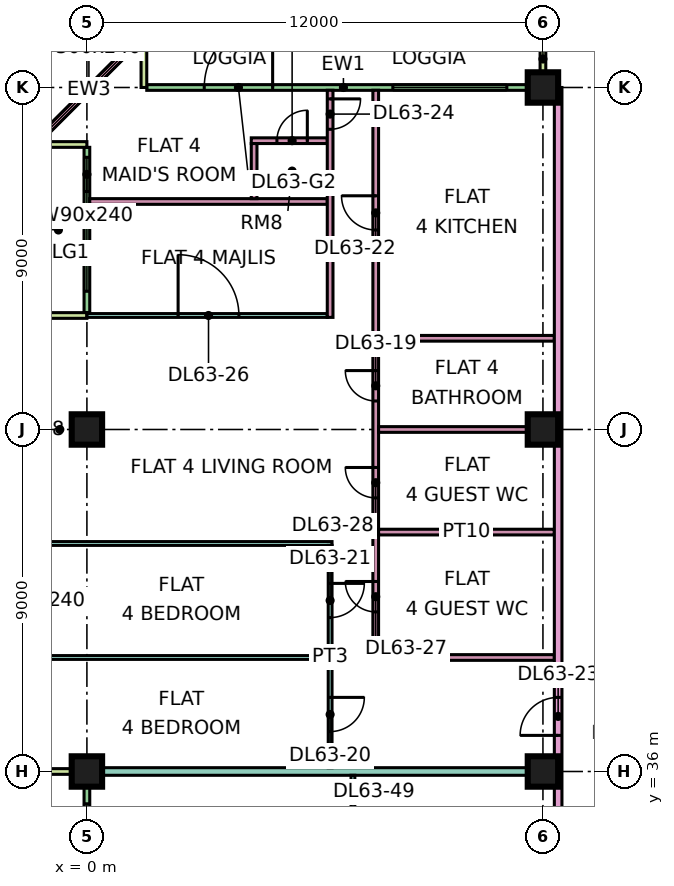
"""IFC4 building model, lengths in metres.
Left out: names, types, materials, properties, quantities, classifications, styles, units other than length and angle.
Written with IfcOpenShell. Run it as: python <this file> out.ifc"""

import sys

from ifc_helpers import new_model, si_unit, direction, frame, frame_2d, origin, origin_2d, place, context, subcontext, project, spatial, rectangle, extrude, element, fill, save


model = new_model("IFC4")
c1 = context("Model", 3, precision=1e-05, world=origin(), true_north=direction((0.0, 1.0)))
c2 = subcontext(c1, "Body", "Model", "MODEL_VIEW")
j1 = project(units=[si_unit("LENGTHUNIT", "METRE"), si_unit("PLANEANGLEUNIT", "RADIAN")], contexts=[c1])
p1 = place(None, origin())
s1 = spatial("IfcSite", under=j1, at=p1, CompositionType="ELEMENT")
p2 = place(p1, origin())
s2 = spatial("IfcBuilding", under=s1, at=p2, CompositionType="ELEMENT")
p3 = place(p2, frame((0.0, 0.0, 273.4)))
s3 = spatial("IfcBuildingStorey", under=s2, at=p3, CompositionType="ELEMENT", Elevation=273.4)
p4 = place(p3, frame((0.0, 36.0, 0.0), z_axis=(0.0, 0.0, 1.0), x_axis=(1.0, 0.0, 0.0)))
e1 = element("IfcColumn", 1, at=p4, inside=s3, PredefinedType="COLUMN", context=c2, shape_type="SweptSolid", body=[
    extrude(rectangle(XDim=0.8, YDim=0.8, at=origin_2d()), origin(), (0.0, 0.0, 1.0), 3.75),
])
for number, where, z_axis, x_axis in (
    (2, (0.0, 45.0, 0.0), (0.0, 0.0, 1.0), (1.0, 0.0, 0.0)),
    (3, (12.0, 36.0, 0.0), (0.0, 0.0, 1.0), (1.0, 0.0, 0.0)),
    (4, (12.0, 45.0, 0.0), (0.0, 0.0, 1.0), (1.0, 0.0, 0.0)),
    (5, (12.0, 54.0, 0.0), (0.0, 0.0, 1.0), (1.0, 0.0, 0.0)),
):
    element("IfcColumn", number, at=place(p3, frame(where, z_axis=z_axis, x_axis=x_axis)), inside=s3, PredefinedType="COLUMN", context=c2, shape_type="SweptSolid", body=[
        extrude(rectangle(XDim=0.8, YDim=0.8, at=origin_2d()), origin(), (0.0, 0.0, 1.0), 3.75),
    ])
p5 = place(p3, frame((11.925, 54.0, 0.0), z_axis=(0.0, 0.0, 1.0), x_axis=(-1.0, 0.0, 0.0)))
e6 = element("IfcWall", 6, at=p5, inside=s3, PredefinedType="SOLIDWALL", context=c2, shape_type="SweptSolid", body=[
    extrude(rectangle(XDim=10.35, YDim=0.15, at=frame_2d((5.175, 0.0))), origin(), (0.0, 0.0, 1.0), 3.35),
])
p6 = place(p5, frame((0.875, 0.0, 0.45)))
e7 = element("IfcOpeningElement", 7, at=p6, cuts=e6, PredefinedType="OPENING", context=c2, shape_type="SweptSolid", body=[
    extrude(rectangle(XDim=3.0, YDim=2.4, at=frame_2d((1.5, 1.2))), frame((0.0, 0.085, 0.0), z_axis=(0.0, -1.0, 0.0), x_axis=(1.0, 0.0, 0.0)), (0.0, 0.0, 1.0), 0.17),
])
p7 = place(p5, frame((7.038, 0.0, 0.0)))
e8 = element("IfcOpeningElement", 8, at=p7, cuts=e6, PredefinedType="OPENING", context=c2, shape_type="SweptSolid", body=[
    extrude(rectangle(XDim=1.8, YDim=2.4, at=frame_2d((0.9, 1.2))), frame((0.0, 0.085, 0.0), z_axis=(0.0, -1.0, 0.0), x_axis=(1.0, 0.0, 0.0)), (0.0, 0.0, 1.0), 0.17),
])
for number, where, z_axis, x_axis in (
    (9, (12.0, 55.5, 0.0), (0.0, 0.0, 1.0), (0.0, -1.0, 0.0)),
    (10, (1.5, 55.5, 0.0), (0.0, 0.0, 1.0), (0.0, -1.0, 0.0)),
):
    element("IfcWall", number, at=place(p3, frame(where, z_axis=z_axis, x_axis=x_axis)), inside=s3, PredefinedType="SOLIDWALL", context=c2, shape_type="SweptSolid", body=[
        extrude(rectangle(XDim=1.5, YDim=0.15, at=frame_2d((0.75, 0.0))), origin(), (0.0, 0.0, 1.0), 3.35),
    ])
p8 = place(p3, frame((1.553, 55.447, 0.0), z_axis=(0.0, 0.0, 1.0), x_axis=(-0.707106781187, -0.707106781187, 0.0)))
e11 = element("IfcWall", 11, at=p8, inside=s3, PredefinedType="SOLIDWALL", context=c2, shape_type="SweptSolid", body=[
    extrude(rectangle(XDim=4.243, YDim=0.15, at=frame_2d((2.121, 0.0))), origin(), (0.0, 0.0, 1.0), 3.35),
])
p9 = place(p8, frame((0.621, 0.0, 0.45)))
e12 = element("IfcOpeningElement", 12, at=p9, cuts=e11, PredefinedType="OPENING", context=c2, shape_type="SweptSolid", body=[
    extrude(rectangle(XDim=3.0, YDim=2.4, at=frame_2d((1.5, 1.2))), frame((0.0, 0.085, 0.0), z_axis=(0.0, -1.0, 0.0), x_axis=(1.0, 0.0, 0.0)), (0.0, 0.0, 1.0), 0.17),
])
p10 = place(p3, frame((0.0, 52.425, 0.0), z_axis=(0.0, 0.0, 1.0), x_axis=(0.0, -1.0, 0.0)))
e13 = element("IfcWall", 13, at=p10, inside=s3, PredefinedType="SOLIDWALL", context=c2, shape_type="SweptSolid", body=[
    extrude(rectangle(XDim=4.35, YDim=0.15, at=frame_2d((2.175, 0.0))), origin(), (0.0, 0.0, 1.0), 3.35),
])
p11 = place(p10, frame((0.262, 0.0, 0.45)))
e14 = element("IfcOpeningElement", 14, at=p11, cuts=e13, PredefinedType="OPENING", context=c2, shape_type="SweptSolid", body=[
    extrude(rectangle(XDim=0.9, YDim=2.4, at=frame_2d((0.45, 1.2))), frame((0.0, 0.085, 0.0), z_axis=(0.0, -1.0, 0.0), x_axis=(1.0, 0.0, 0.0)), (0.0, 0.0, 1.0), 0.17),
])
p12 = place(p10, frame((1.988, 0.0, 0.45)))
e15 = element("IfcOpeningElement", 15, at=p12, cuts=e13, PredefinedType="OPENING", context=c2, shape_type="SweptSolid", body=[
    extrude(rectangle(XDim=1.8, YDim=2.4, at=frame_2d((0.9, 1.2))), frame((0.0, 0.085, 0.0), z_axis=(0.0, -1.0, 0.0), x_axis=(1.0, 0.0, 0.0)), (0.0, 0.0, 1.0), 0.17),
])
for number, where, z_axis, x_axis in (
    (16, (-1.5, 52.5, 0.0), (0.0, 0.0, 1.0), (1.0, 0.0, 0.0)),
    (17, (-1.5, 48.0, 0.0), (0.0, 0.0, 1.0), (1.0, 0.0, 0.0)),
):
    element("IfcWall", number, at=place(p3, frame(where, z_axis=z_axis, x_axis=x_axis)), inside=s3, PredefinedType="SOLIDWALL", context=c2, shape_type="SweptSolid", body=[
        extrude(rectangle(XDim=1.5, YDim=0.15, at=frame_2d((0.75, 0.0))), origin(), (0.0, 0.0, 1.0), 3.35),
    ])
p13 = place(p3, frame((0.0, 35.925, 0.0), z_axis=(0.0, 0.0, 1.0), x_axis=(0.0, -1.0, 0.0)))
e18 = element("IfcWall", 18, at=p13, inside=s3, PredefinedType="SOLIDWALL", context=c2, shape_type="SweptSolid", body=[
    extrude(rectangle(XDim=11.85, YDim=0.15, at=frame_2d((5.925, 0.0))), origin(), (0.0, 0.0, 1.0), 3.35),
])
p14 = place(p13, frame((0.775, 0.0, 0.45)))
e19 = element("IfcOpeningElement", 19, at=p14, cuts=e18, PredefinedType="OPENING", context=c2, shape_type="SweptSolid", body=[
    extrude(rectangle(XDim=1.8, YDim=2.4, at=frame_2d((0.9, 1.2))), frame((0.0, 0.085, 0.0), z_axis=(0.0, -1.0, 0.0), x_axis=(1.0, 0.0, 0.0)), (0.0, 0.0, 1.0), 0.17),
])
p15 = place(p13, frame((3.525, 0.0, 0.0)))
e20 = element("IfcOpeningElement", 20, at=p15, cuts=e18, PredefinedType="OPENING", context=c2, shape_type="SweptSolid", body=[
    extrude(rectangle(XDim=1.8, YDim=2.4, at=frame_2d((0.9, 1.2))), frame((0.0, 0.085, 0.0), z_axis=(0.0, -1.0, 0.0), x_axis=(1.0, 0.0, 0.0)), (0.0, 0.0, 1.0), 0.17),
])
p16 = place(p13, frame((7.175, 0.0, 0.45)))
e21 = element("IfcOpeningElement", 21, at=p16, cuts=e18, PredefinedType="OPENING", context=c2, shape_type="SweptSolid", body=[
    extrude(rectangle(XDim=3.0, YDim=2.4, at=frame_2d((1.5, 1.2))), frame((0.0, 0.085, 0.0), z_axis=(0.0, -1.0, 0.0), x_axis=(1.0, 0.0, 0.0)), (0.0, 0.0, 1.0), 0.17),
])
p17 = place(p3, frame((-1.5, 36.0, 0.0), z_axis=(0.0, 0.0, 1.0), x_axis=(1.0, 0.0, 0.0)))
e22 = element("IfcWall", 22, at=p17, inside=s3, PredefinedType="SOLIDWALL", context=c2, shape_type="SweptSolid", body=[
    extrude(rectangle(XDim=1.5, YDim=0.15, at=frame_2d((0.75, 0.0))), origin(), (0.0, 0.0, 1.0), 3.35),
])
p18 = place(p3, frame((-1.351, 39.0, 0.0), z_axis=(0.0, 0.0, 1.0), x_axis=(1.0, 0.0, 0.0)))
e23 = element("IfcWall", 23, at=p18, inside=s3, PredefinedType="PARTITIONING", context=c2, shape_type="SweptSolid", body=[
    extrude(rectangle(XDim=7.701, YDim=0.1, at=frame_2d((3.851, 0.0))), origin(), (0.0, 0.0, 1.0), 3.35),
])
e24 = element("IfcWall", 24, at=p4, inside=s3, PredefinedType="PARTITIONING", context=c2, shape_type="SweptSolid", body=[
    extrude(rectangle(XDim=12.3, YDim=0.2, at=frame_2d((6.15, 0.0))), origin(), (0.0, 0.0, 1.0), 3.35),
])
p19 = place(p3, frame((-1.35, 42.0, 0.0), z_axis=(0.0, 0.0, 1.0), x_axis=(1.0, 0.0, 0.0)))
e25 = element("IfcWall", 25, at=p19, inside=s3, PredefinedType="PARTITIONING", context=c2, shape_type="SweptSolid", body=[
    extrude(rectangle(XDim=7.8, YDim=0.1, at=frame_2d((3.9, 0.0))), origin(), (0.0, 0.0, 1.0), 3.35),
])
p20 = place(p3, frame((0.0, 48.0, 0.0), z_axis=(0.0, 0.0, 1.0), x_axis=(1.0, 0.0, 0.0)))
e26 = element("IfcWall", 26, at=p20, inside=s3, PredefinedType="PARTITIONING", context=c2, shape_type="SweptSolid", body=[
    extrude(rectangle(XDim=6.325, YDim=0.1, at=frame_2d((3.163, 0.0))), origin(), (0.0, 0.0, 1.0), 3.35),
])
p21 = place(p20, frame((2.4, 0.0, 0.0)))
e27 = element("IfcOpeningElement", 27, at=p21, cuts=e26, PredefinedType="OPENING", context=c2, shape_type="SweptSolid", body=[
    extrude(rectangle(XDim=1.6, YDim=2.1, at=frame_2d((0.8, 1.05))), frame((0.0, 0.06, 0.0), z_axis=(0.0, -1.0, 0.0), x_axis=(1.0, 0.0, 0.0)), (0.0, 0.0, 1.0), 0.12),
])
p22 = place(p3, frame((0.074, 51.0, 0.0), z_axis=(0.0, 0.0, 1.0), x_axis=(1.0, 0.0, 0.0)))
e28 = element("IfcWall", 28, at=p22, inside=s3, PredefinedType="PARTITIONING", context=c2, shape_type="SweptSolid", body=[
    extrude(rectangle(XDim=6.251, YDim=0.15, at=frame_2d((3.125, 0.0))), origin(), (0.0, 0.0, 1.0), 3.35),
])
p23 = place(p3, frame((4.325, 52.6, 0.0), z_axis=(0.0, 0.0, 1.0), x_axis=(1.0, 0.0, 0.0)))
e29 = element("IfcWall", 29, at=p23, inside=s3, PredefinedType="PARTITIONING", context=c2, shape_type="SweptSolid", body=[
    extrude(rectangle(XDim=2.0, YDim=0.15, at=frame_2d((1.0, 0.0))), origin(), (0.0, 0.0, 1.0), 3.35),
])
p24 = place(p23, frame((0.675, 0.0, 0.0)))
e30 = element("IfcOpeningElement", 30, at=p24, cuts=e29, PredefinedType="OPENING", context=c2, shape_type="SweptSolid", body=[
    extrude(rectangle(XDim=0.8, YDim=2.1, at=frame_2d((0.4, 1.05))), frame((0.0, 0.085, 0.0), z_axis=(0.0, -1.0, 0.0), x_axis=(1.0, 0.0, 0.0)), (0.0, 0.0, 1.0), 0.17),
])
p25 = place(p3, frame((4.4, 51.075, 0.0), z_axis=(0.0, 0.0, 1.0), x_axis=(0.0, 1.0, 0.0)))
e31 = element("IfcWall", 31, at=p25, inside=s3, PredefinedType="PARTITIONING", context=c2, shape_type="SweptSolid", body=[
    extrude(rectangle(XDim=1.45, YDim=0.15, at=frame_2d((0.725, 0.0))), origin(), (0.0, 0.0, 1.0), 3.35),
])
p26 = place(p3, frame((6.4, 36.1, 0.0), z_axis=(0.0, 0.0, 1.0), x_axis=(0.0, 1.0, 0.0)))
e32 = element("IfcWall", 32, at=p26, inside=s3, PredefinedType="PARTITIONING", context=c2, shape_type="SweptSolid", body=[
    extrude(rectangle(XDim=5.85, YDim=0.1, at=frame_2d((2.925, 0.0))), origin(), (0.0, 0.0, 1.0), 3.35),
])
p27 = place(p26, frame((0.95, 0.0, 0.0)))
e33 = element("IfcOpeningElement", 33, at=p27, cuts=e32, PredefinedType="OPENING", context=c2, shape_type="SweptSolid", body=[
    extrude(rectangle(XDim=0.9, YDim=2.1, at=frame_2d((0.45, 1.05))), frame((0.0, 0.06, 0.0), z_axis=(0.0, -1.0, 0.0), x_axis=(1.0, 0.0, 0.0)), (0.0, 0.0, 1.0), 0.12),
])
p28 = place(p26, frame((3.95, 0.0, 0.0)))
e34 = element("IfcOpeningElement", 34, at=p28, cuts=e32, PredefinedType="OPENING", context=c2, shape_type="SweptSolid", body=[
    extrude(rectangle(XDim=0.9, YDim=2.1, at=frame_2d((0.45, 1.05))), frame((0.0, 0.06, 0.0), z_axis=(0.0, -1.0, 0.0), x_axis=(1.0, 0.0, 0.0)), (0.0, 0.0, 1.0), 0.12),
])
p29 = place(p3, frame((6.4, 47.95, 0.0), z_axis=(0.0, 0.0, 1.0), x_axis=(0.0, 1.0, 0.0)))
e35 = element("IfcWall", 35, at=p29, inside=s3, PredefinedType="PARTITIONING", context=c2, shape_type="SweptSolid", body=[
    extrude(rectangle(XDim=5.976, YDim=0.15, at=frame_2d((2.988, 0.0))), origin(), (0.0, 0.0, 1.0), 3.35),
])
p30 = place(p29, frame((4.95, 0.0, 0.0)))
e36 = element("IfcOpeningElement", 36, at=p30, cuts=e35, PredefinedType="OPENING", context=c2, shape_type="SweptSolid", body=[
    extrude(rectangle(XDim=0.8, YDim=2.1, at=frame_2d((0.4, 1.05))), frame((0.0, 0.085, 0.0), z_axis=(0.0, -1.0, 0.0), x_axis=(1.0, 0.0, 0.0)), (0.0, 0.0, 1.0), 0.17),
])
p31 = place(p3, frame((7.0, 30.05, 0.0), z_axis=(0.0, 0.0, 1.0), x_axis=(0.0, 1.0, 0.0)))
e37 = element("IfcWall", 37, at=p31, inside=s3, PredefinedType="PARTITIONING", context=c2, shape_type="SweptSolid", body=[
    extrude(rectangle(XDim=5.85, YDim=0.1, at=frame_2d((2.925, 0.0))), origin(), (0.0, 0.0, 1.0), 3.35),
])
p32 = place(p31, frame((1.0, 0.0, 0.0)))
e38 = element("IfcOpeningElement", 38, at=p32, cuts=e37, PredefinedType="OPENING", context=c2, shape_type="SweptSolid", body=[
    extrude(rectangle(XDim=0.9, YDim=2.1, at=frame_2d((0.45, 1.05))), frame((0.0, 0.06, 0.0), z_axis=(0.0, -1.0, 0.0), x_axis=(1.0, 0.0, 0.0)), (0.0, 0.0, 1.0), 0.12),
])
p33 = place(p31, frame((4.0, 0.0, 0.0)))
e39 = element("IfcOpeningElement", 39, at=p33, cuts=e37, PredefinedType="OPENING", context=c2, shape_type="SweptSolid", body=[
    extrude(rectangle(XDim=0.9, YDim=2.1, at=frame_2d((0.45, 1.05))), frame((0.0, 0.06, 0.0), z_axis=(0.0, -1.0, 0.0), x_axis=(1.0, 0.0, 0.0)), (0.0, 0.0, 1.0), 0.12),
])
p34 = place(p3, frame((7.6, 38.925, 0.0), z_axis=(0.0, 0.0, 1.0), x_axis=(0.0, 1.0, 0.0)))
e40 = element("IfcWall", 40, at=p34, inside=s3, PredefinedType="PARTITIONING", context=c2, shape_type="SweptSolid", body=[
    extrude(rectangle(XDim=15.001, YDim=0.15, at=frame_2d((7.5, 0.0))), origin(), (0.0, 0.0, 1.0), 3.35),
])
p35 = place(p34, frame((6.825, 0.0, 0.0)))
e41 = element("IfcOpeningElement", 41, at=p35, cuts=e40, PredefinedType="OPENING", context=c2, shape_type="SweptSolid", body=[
    extrude(rectangle(XDim=0.8, YDim=2.1, at=frame_2d((0.4, 1.05))), frame((0.0, 0.085, 0.0), z_axis=(0.0, -1.0, 0.0), x_axis=(1.0, 0.0, 0.0)), (0.0, 0.0, 1.0), 0.17),
])
p36 = place(p34, frame((11.325, 0.0, 0.0)))
e42 = element("IfcOpeningElement", 42, at=p36, cuts=e40, PredefinedType="OPENING", context=c2, shape_type="SweptSolid", body=[
    extrude(rectangle(XDim=0.9, YDim=2.1, at=frame_2d((0.45, 1.05))), frame((0.0, 0.085, 0.0), z_axis=(0.0, -1.0, 0.0), x_axis=(1.0, 0.0, 0.0)), (0.0, 0.0, 1.0), 0.17),
])
p37 = place(p34, frame((1.275, 0.0, 0.0)))
e43 = element("IfcOpeningElement", 43, at=p37, cuts=e40, PredefinedType="OPENING", context=c2, shape_type="SweptSolid", body=[
    extrude(rectangle(XDim=0.8, YDim=2.1, at=frame_2d((0.4, 1.05))), frame((0.0, 0.085, 0.0), z_axis=(0.0, -1.0, 0.0), x_axis=(1.0, 0.0, 0.0)), (0.0, 0.0, 1.0), 0.17),
])
p38 = place(p34, frame((4.275, 0.0, 0.0)))
e44 = element("IfcOpeningElement", 44, at=p38, cuts=e40, PredefinedType="OPENING", context=c2, shape_type="SweptSolid", body=[
    extrude(rectangle(XDim=0.8, YDim=2.1, at=frame_2d((0.4, 1.05))), frame((0.0, 0.085, 0.0), z_axis=(0.0, -1.0, 0.0), x_axis=(1.0, 0.0, 0.0)), (0.0, 0.0, 1.0), 0.17),
])
for number, where, z_axis, x_axis in (
    (45, (7.675, 39.0, 0.0), (0.0, 0.0, 1.0), (1.0, 0.0, 0.0)),
    (46, (7.675, 42.3, 0.0), (0.0, 0.0, 1.0), (1.0, 0.0, 0.0)),
    (47, (7.675, 45.0, 0.0), (0.0, 0.0, 1.0), (1.0, 0.0, 0.0)),
    (48, (7.675, 47.4, 0.0), (0.0, 0.0, 1.0), (1.0, 0.0, 0.0)),
):
    element("IfcWall", number, at=place(p3, frame(where, z_axis=z_axis, x_axis=x_axis)), inside=s3, PredefinedType="PARTITIONING", context=c2, shape_type="SweptSolid", body=[
        extrude(rectangle(XDim=4.625, YDim=0.15, at=frame_2d((2.312, 0.0))), origin(), (0.0, 0.0, 1.0), 3.35),
    ])
p39 = place(p3, frame((12.4, 20.0, 0.0), z_axis=(0.0, 0.0, 1.0), x_axis=(0.0, 1.0, 0.0)))
e49 = element("IfcWall", 49, at=p39, inside=s3, PredefinedType="PARTITIONING", context=c2, shape_type="SweptSolid", body=[
    extrude(rectangle(XDim=34.0, YDim=0.2, at=frame_2d((17.0, 0.0))), origin(), (0.0, 0.0, 1.0), 3.35),
])
p40 = place(p39, frame((16.95, 0.0, 0.0)))
e50 = element("IfcOpeningElement", 50, at=p40, cuts=e49, PredefinedType="OPENING", context=c2, shape_type="SweptSolid", body=[
    extrude(rectangle(XDim=1.0, YDim=2.1, at=frame_2d((0.5, 1.05))), frame((0.0, 0.11, 0.0), z_axis=(0.0, -1.0, 0.0), x_axis=(1.0, 0.0, 0.0)), (0.0, 0.0, 1.0), 0.22),
])
p41 = place(p39, frame((0.6, 0.0, 0.0)))
e51 = element("IfcOpeningElement", 51, at=p41, cuts=e49, PredefinedType="OPENING", context=c2, shape_type="SweptSolid", body=[
    extrude(rectangle(XDim=1.2, YDim=2.1, at=frame_2d((0.6, 1.05))), frame((0.0, 0.11, 0.0), z_axis=(0.0, -1.0, 0.0), x_axis=(1.0, 0.0, 0.0)), (0.0, 0.0, 1.0), 0.22),
])
p42 = place(p39, frame((13.65, 0.0, 0.0)))
e52 = element("IfcOpeningElement", 52, at=p42, cuts=e49, PredefinedType="OPENING", context=c2, shape_type="SweptSolid", body=[
    extrude(rectangle(XDim=1.0, YDim=2.1, at=frame_2d((0.5, 1.05))), frame((0.0, 0.11, 0.0), z_axis=(0.0, -1.0, 0.0), x_axis=(1.0, 0.0, 0.0)), (0.0, 0.0, 1.0), 0.22),
])
p43 = place(p6, origin())
e53 = element("IfcWindow", 53, at=p43, inside=s3, PartitioningType="SINGLE_PANEL", PredefinedType="WINDOW", context=c2, shape_type="SweptSolid", body=[
    extrude(rectangle(XDim=3.0, YDim=2.4, at=frame_2d((1.5, 1.2))), frame((0.0, 0.03, 0.0), z_axis=(0.0, -1.0, 0.0), x_axis=(1.0, 0.0, 0.0)), (0.0, 0.0, 1.0), 0.06),
])
fill(e7, e53)
p44 = place(p7, frame((1.8, 0.0, 0.0), z_axis=(0.0, 0.0, 1.0), x_axis=(-1.0, 0.0, 0.0)))
e54 = element("IfcDoor", 54, at=p44, inside=s3, OperationType="DOUBLE_DOOR_SINGLE_SWING", PredefinedType="DOOR", context=c2, shape_type="SweptSolid", body=[
    extrude(rectangle(XDim=1.8, YDim=2.4, at=frame_2d((0.9, 1.2))), frame((0.0, 0.025, 0.0), z_axis=(0.0, -1.0, 0.0), x_axis=(1.0, 0.0, 0.0)), (0.0, 0.0, 1.0), 0.05),
])
fill(e8, e54)
p45 = place(p9, origin())
e55 = element("IfcWindow", 55, at=p45, inside=s3, PartitioningType="SINGLE_PANEL", PredefinedType="WINDOW", context=c2, shape_type="SweptSolid", body=[
    extrude(rectangle(XDim=3.0, YDim=2.4, at=frame_2d((1.5, 1.2))), frame((0.0, 0.03, 0.0), z_axis=(0.0, -1.0, 0.0), x_axis=(1.0, 0.0, 0.0)), (0.0, 0.0, 1.0), 0.06),
])
fill(e12, e55)
p46 = place(p11, origin())
e56 = element("IfcWindow", 56, at=p46, inside=s3, PartitioningType="SINGLE_PANEL", PredefinedType="WINDOW", context=c2, shape_type="SweptSolid", body=[
    extrude(rectangle(XDim=0.9, YDim=2.4, at=frame_2d((0.45, 1.2))), frame((0.0, 0.03, 0.0), z_axis=(0.0, -1.0, 0.0), x_axis=(1.0, 0.0, 0.0)), (0.0, 0.0, 1.0), 0.06),
])
fill(e14, e56)
p47 = place(p12, origin())
e57 = element("IfcWindow", 57, at=p47, inside=s3, PartitioningType="SINGLE_PANEL", PredefinedType="WINDOW", context=c2, shape_type="SweptSolid", body=[
    extrude(rectangle(XDim=1.8, YDim=2.4, at=frame_2d((0.9, 1.2))), frame((0.0, 0.03, 0.0), z_axis=(0.0, -1.0, 0.0), x_axis=(1.0, 0.0, 0.0)), (0.0, 0.0, 1.0), 0.06),
])
fill(e15, e57)
p48 = place(p14, origin())
e58 = element("IfcWindow", 58, at=p48, inside=s3, PartitioningType="SINGLE_PANEL", PredefinedType="WINDOW", context=c2, shape_type="SweptSolid", body=[
    extrude(rectangle(XDim=1.8, YDim=2.4, at=frame_2d((0.9, 1.2))), frame((0.0, 0.03, 0.0), z_axis=(0.0, -1.0, 0.0), x_axis=(1.0, 0.0, 0.0)), (0.0, 0.0, 1.0), 0.06),
])
fill(e19, e58)
p49 = place(p35, frame((0.8, 0.0, 0.0), z_axis=(0.0, 0.0, 1.0), x_axis=(-1.0, 0.0, 0.0)))
e59 = element("IfcDoor", 59, at=p49, inside=s3, OperationType="SINGLE_SWING_RIGHT", PredefinedType="DOOR", context=c2, shape_type="SweptSolid", body=[
    extrude(rectangle(XDim=0.8, YDim=2.1, at=frame_2d((0.4, 1.05))), frame((0.0, 0.025, 0.0), z_axis=(0.0, -1.0, 0.0), x_axis=(1.0, 0.0, 0.0)), (0.0, 0.0, 1.0), 0.05),
])
fill(e41, e59)
p50 = place(p27, origin())
e60 = element("IfcDoor", 60, at=p50, inside=s3, OperationType="SINGLE_SWING_RIGHT", PredefinedType="DOOR", context=c2, shape_type="SweptSolid", body=[
    extrude(rectangle(XDim=0.9, YDim=2.1, at=frame_2d((0.45, 1.05))), frame((0.0, 0.025, 0.0), z_axis=(0.0, -1.0, 0.0), x_axis=(1.0, 0.0, 0.0)), (0.0, 0.0, 1.0), 0.05),
])
fill(e33, e60)
p51 = place(p28, origin())
e61 = element("IfcDoor", 61, at=p51, inside=s3, OperationType="SINGLE_SWING_RIGHT", PredefinedType="DOOR", context=c2, shape_type="SweptSolid", body=[
    extrude(rectangle(XDim=0.9, YDim=2.1, at=frame_2d((0.45, 1.05))), frame((0.0, 0.025, 0.0), z_axis=(0.0, -1.0, 0.0), x_axis=(1.0, 0.0, 0.0)), (0.0, 0.0, 1.0), 0.05),
])
fill(e34, e61)
p52 = place(p36, frame((0.9, 0.0, 0.0), z_axis=(0.0, 0.0, 1.0), x_axis=(-1.0, 0.0, 0.0)))
e62 = element("IfcDoor", 62, at=p52, inside=s3, OperationType="SINGLE_SWING_RIGHT", PredefinedType="DOOR", context=c2, shape_type="SweptSolid", body=[
    extrude(rectangle(XDim=0.9, YDim=2.1, at=frame_2d((0.45, 1.05))), frame((0.0, 0.025, 0.0), z_axis=(0.0, -1.0, 0.0), x_axis=(1.0, 0.0, 0.0)), (0.0, 0.0, 1.0), 0.05),
])
fill(e42, e62)
p53 = place(p40, origin())
e63 = element("IfcDoor", 63, at=p53, inside=s3, OperationType="SINGLE_SWING_LEFT", PredefinedType="DOOR", context=c2, shape_type="SweptSolid", body=[
    extrude(rectangle(XDim=1.0, YDim=2.1, at=frame_2d((0.5, 1.05))), frame((0.0, 0.025, 0.0), z_axis=(0.0, -1.0, 0.0), x_axis=(1.0, 0.0, 0.0)), (0.0, 0.0, 1.0), 0.05),
])
fill(e50, e63)
p54 = place(p30, origin())
e64 = element("IfcDoor", 64, at=p54, inside=s3, OperationType="SINGLE_SWING_RIGHT", PredefinedType="DOOR", context=c2, shape_type="SweptSolid", body=[
    extrude(rectangle(XDim=0.8, YDim=2.1, at=frame_2d((0.4, 1.05))), frame((0.0, 0.025, 0.0), z_axis=(0.0, -1.0, 0.0), x_axis=(1.0, 0.0, 0.0)), (0.0, 0.0, 1.0), 0.05),
])
fill(e36, e64)
p55 = place(p24, frame((0.8, 0.0, 0.0), z_axis=(0.0, 0.0, 1.0), x_axis=(-1.0, 0.0, 0.0)))
e65 = element("IfcDoor", 65, at=p55, inside=s3, OperationType="SINGLE_SWING_RIGHT", PredefinedType="DOOR", context=c2, shape_type="SweptSolid", body=[
    extrude(rectangle(XDim=0.8, YDim=2.1, at=frame_2d((0.4, 1.05))), frame((0.0, 0.025, 0.0), z_axis=(0.0, -1.0, 0.0), x_axis=(1.0, 0.0, 0.0)), (0.0, 0.0, 1.0), 0.05),
])
fill(e30, e65)
p56 = place(p21, origin())
e66 = element("IfcDoor", 66, at=p56, inside=s3, OperationType="DOUBLE_DOOR_SINGLE_SWING", PredefinedType="DOOR", context=c2, shape_type="SweptSolid", body=[
    extrude(rectangle(XDim=1.6, YDim=2.1, at=frame_2d((0.8, 1.05))), frame((0.0, 0.025, 0.0), z_axis=(0.0, -1.0, 0.0), x_axis=(1.0, 0.0, 0.0)), (0.0, 0.0, 1.0), 0.05),
])
fill(e27, e66)
p57 = place(p37, frame((0.8, 0.0, 0.0), z_axis=(0.0, 0.0, 1.0), x_axis=(-1.0, 0.0, 0.0)))
e67 = element("IfcDoor", 67, at=p57, inside=s3, OperationType="SINGLE_SWING_RIGHT", PredefinedType="DOOR", context=c2, shape_type="SweptSolid", body=[
    extrude(rectangle(XDim=0.8, YDim=2.1, at=frame_2d((0.4, 1.05))), frame((0.0, 0.025, 0.0), z_axis=(0.0, -1.0, 0.0), x_axis=(1.0, 0.0, 0.0)), (0.0, 0.0, 1.0), 0.05),
])
fill(e43, e67)
p58 = place(p38, frame((0.8, 0.0, 0.0), z_axis=(0.0, 0.0, 1.0), x_axis=(-1.0, 0.0, 0.0)))
e68 = element("IfcDoor", 68, at=p58, inside=s3, OperationType="SINGLE_SWING_RIGHT", PredefinedType="DOOR", context=c2, shape_type="SweptSolid", body=[
    extrude(rectangle(XDim=0.8, YDim=2.1, at=frame_2d((0.4, 1.05))), frame((0.0, 0.025, 0.0), z_axis=(0.0, -1.0, 0.0), x_axis=(1.0, 0.0, 0.0)), (0.0, 0.0, 1.0), 0.05),
])
fill(e44, e68)
save(model, sys.argv[1])
